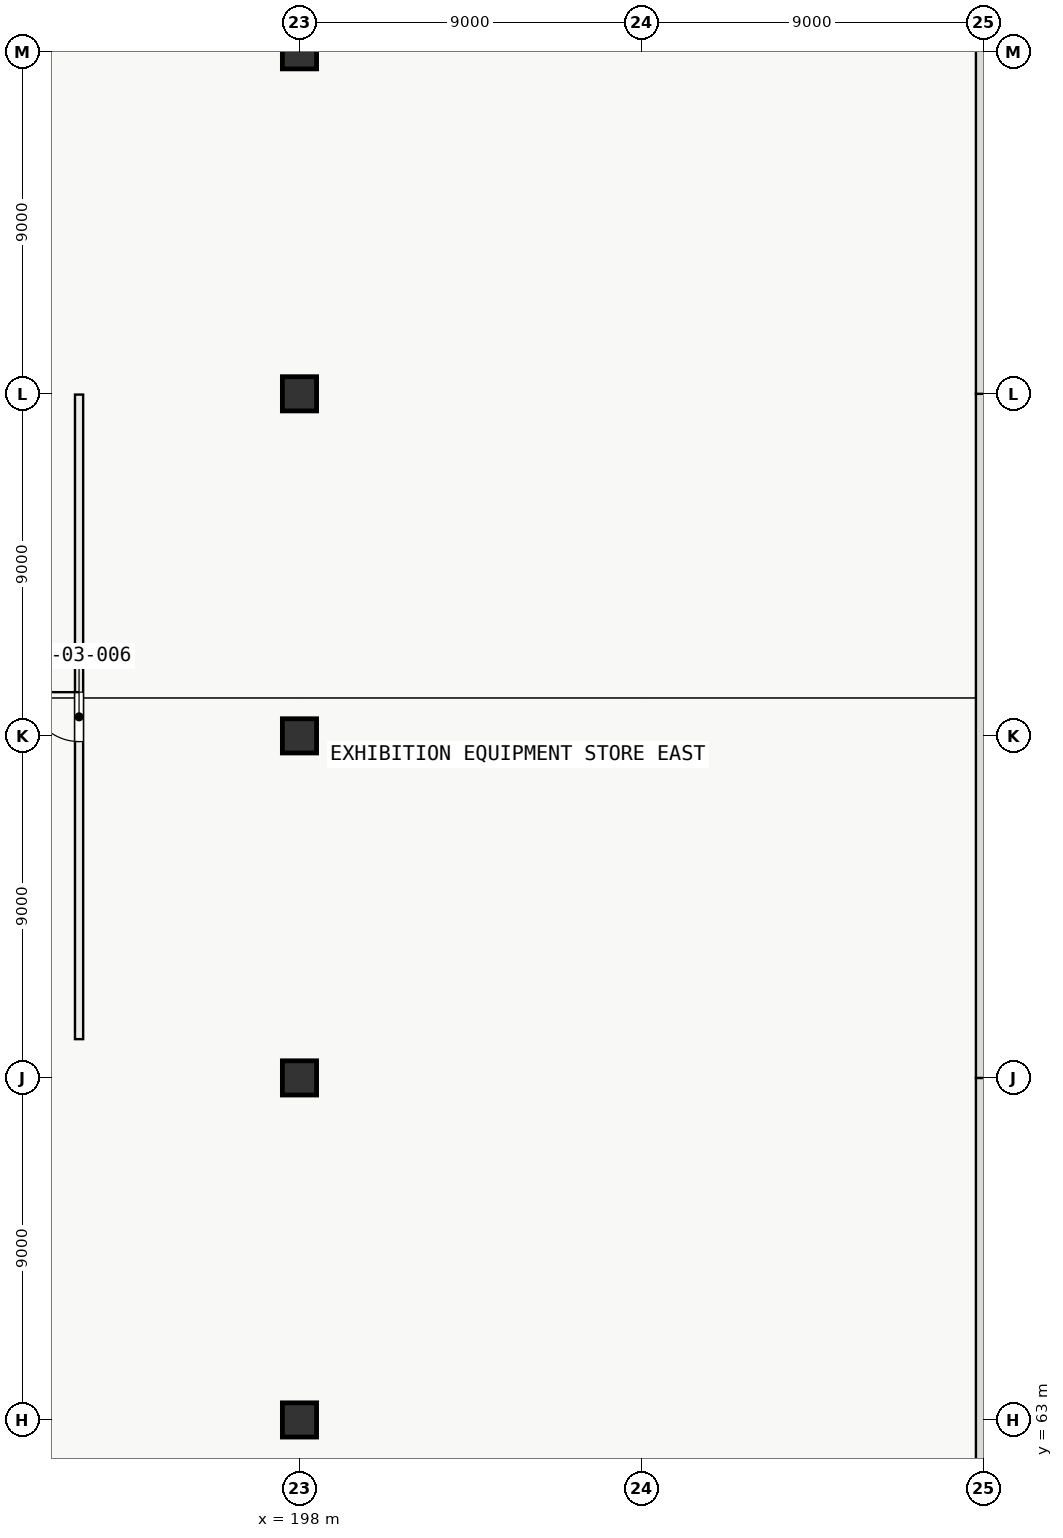
"""IFC4 building model, lengths in metres.
Left out: names, types, materials, properties, quantities, classifications, styles, units other than length and angle.
Written with IfcOpenShell. Run it as: python <this file> out.ifc"""

import sys

from ifc_helpers import new_model, si_unit, direction, frame, frame_2d, origin, origin_2d, place, context, subcontext, project, spatial, rectangle, extrude, element, fill, save


model = new_model("IFC4")
c1 = context("Model", 3, precision=1e-05, world=origin(), true_north=direction((0.0, 1.0)))
c2 = subcontext(c1, "Body", "Model", "MODEL_VIEW")
j1 = project(units=[si_unit("LENGTHUNIT", "METRE"), si_unit("PLANEANGLEUNIT", "RADIAN")], contexts=[c1])
p1 = place(None, origin())
s1 = spatial("IfcSite", under=j1, at=p1, CompositionType="ELEMENT")
p2 = place(p1, origin())
s2 = spatial("IfcBuilding", under=s1, at=p2, CompositionType="ELEMENT")
p3 = place(p2, frame((0.0, 0.0, -4.8)))
s3 = spatial("IfcBuildingStorey", under=s2, at=p3, CompositionType="ELEMENT", Elevation=-4.8)
for number, where, z_axis, x_axis in (
    (1, (216.0, 54.0, -0.45), (0.0, 0.0, 1.0), (0.0, 1.0, 0.0)),
    (2, (216.0, 72.0, -0.45), (0.0, 0.0, 1.0), (0.0, 1.0, 0.0)),
    (3, (216.0, 90.0, -0.45), (0.0, 0.0, 1.0), (0.0, 1.0, 0.0)),
):
    element("IfcWall", number, at=place(p3, frame(where, z_axis=z_axis, x_axis=x_axis)), inside=s3, PredefinedType="USERDEFINED", context=c2, shape_type="SweptSolid", body=[
        extrude(rectangle(XDim=18.0, YDim=0.4, at=frame_2d((9.0, 0.0))), origin(), (0.0, 0.0, 1.0), 5.25),
    ])
for number, where, z_axis, x_axis in (
    (4, (198.0, 63.0, -0.45), (0.0, 0.0, 1.0), (1.0, 0.0, 0.0)),
    (5, (198.0, 72.0, -0.45), (0.0, 0.0, 1.0), (1.0, 0.0, 0.0)),
    (6, (198.0, 81.0, -0.45), (0.0, 0.0, 1.0), (1.0, 0.0, 0.0)),
    (7, (198.0, 90.0, -0.45), (0.0, 0.0, 1.0), (1.0, 0.0, 0.0)),
    (8, (198.0, 99.0, -0.45), (0.0, 0.0, 1.0), (1.0, 0.0, 0.0)),
):
    element("IfcColumn", number, at=place(p3, frame(where, z_axis=z_axis, x_axis=x_axis)), inside=s3, PredefinedType="COLUMN", context=c2, shape_type="SweptSolid", body=[
        extrude(rectangle(XDim=0.9, YDim=0.9, at=origin_2d()), origin(), (0.0, 0.0, 1.0), 5.25),
    ])
p4 = place(p3, frame((192.2, 73.02, 0.0), z_axis=(0.0, 0.0, 1.0), x_axis=(0.0, 1.0, 0.0)))
e9 = element("IfcWall", 9, at=p4, inside=s3, PredefinedType="PARTITIONING", context=c2, shape_type="SweptSolid", body=[
    extrude(rectangle(XDim=16.96, YDim=0.215, at=frame_2d((8.48, 0.0))), origin(), (0.0, 0.0, 1.0), 3.42),
])
p5 = place(p4, frame((7.83, 0.0, 0.0)))
e10 = element("IfcOpeningElement", 10, at=p5, cuts=e9, PredefinedType="OPENING", context=c2, shape_type="SweptSolid", body=[
    extrude(rectangle(XDim=1.3, YDim=2.25, at=frame_2d((0.65, 1.125))), frame((0.0, 0.117, 0.0), z_axis=(0.0, -1.0, 0.0), x_axis=(1.0, 0.0, 0.0)), (0.0, 0.0, 1.0), 0.235),
])
p6 = place(p5, origin())
e11 = element("IfcDoor", 11, at=p6, inside=s3, OperationType="SINGLE_SWING_RIGHT", PredefinedType="DOOR", context=c2, shape_type="SweptSolid", body=[
    extrude(rectangle(XDim=1.3, YDim=2.25, at=frame_2d((0.65, 1.125))), frame((0.0, 0.025, 0.0), z_axis=(0.0, -1.0, 0.0), x_axis=(1.0, 0.0, 0.0)), (0.0, 0.0, 1.0), 0.05),
])
fill(e10, e11)
save(model, sys.argv[1])
